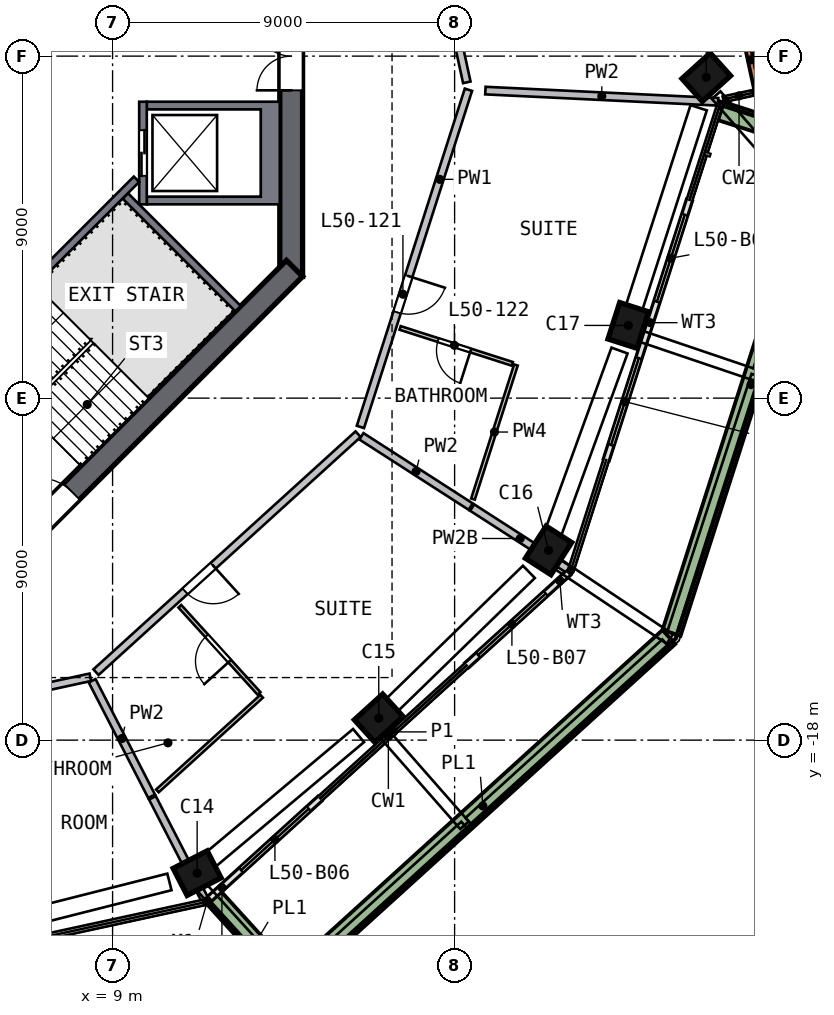
"""IFC4 building model, lengths in metres.
Left out: names, types, materials, properties, quantities, classifications, styles, units other than length and angle.
Written with IfcOpenShell. Run it as: python <this file> out.ifc"""

import sys

from ifc_helpers import new_model, si_unit, direction, frame, frame_2d, origin, origin_2d, place, context, subcontext, project, spatial, polyline, rectangle, outline, extrude, element, fill, save


model = new_model("IFC4")
c1 = context("Model", 3, precision=1e-05, world=origin(), true_north=direction((0.0, 1.0)))
c2 = subcontext(c1, "Body", "Model", "MODEL_VIEW")
j1 = project(units=[si_unit("LENGTHUNIT", "METRE"), si_unit("PLANEANGLEUNIT", "RADIAN")], contexts=[c1])
p1 = place(None, origin())
s1 = spatial("IfcSite", under=j1, at=p1, CompositionType="ELEMENT")
p2 = place(p1, origin())
s2 = spatial("IfcBuilding", under=s1, at=p2, CompositionType="ELEMENT")
p3 = place(p2, frame((0.0, 0.0, 205.5)))
s3 = spatial("IfcBuildingStorey", under=s2, at=p3, CompositionType="ELEMENT", Elevation=205.5)
p4 = place(p3, frame((11.102, -21.565, 0.0), z_axis=(0.102099777, 0.053672705, 0.993325161), x_axis=(-0.883131513, -0.4547247, 0.115343736)))
e1 = element("IfcColumn", 1, at=p4, inside=s3, PredefinedType="COLUMN", context=c2, shape_type="SweptSolid", body=[
    extrude(rectangle(XDim=1.0, YDim=0.8, at=origin_2d()), origin(), (0.0, 0.0, 1.0), 3.211),
])
p5 = place(p3, frame((15.904, -17.515, 0.0), z_axis=(0.082664599, 0.076352583, 0.993648251), x_axis=(0.735625089, 0.667977152, -0.112526675)))
e2 = element("IfcColumn", 2, at=p5, inside=s3, PredefinedType="COLUMN", context=c2, shape_type="SweptSolid", body=[
    extrude(rectangle(XDim=1.0, YDim=0.8, at=origin_2d()), origin(), (0.0, 0.0, 1.0), 3.21),
])
p6 = place(p3, frame((20.397, -13.125, 0.0), z_axis=(0.061579147, 0.097538328, 0.993324863), x_axis=(-0.537392943, -0.83540652, 0.115346307)))
e3 = element("IfcColumn", 3, at=p6, inside=s3, PredefinedType="COLUMN", context=c2, shape_type="SweptSolid", body=[
    extrude(rectangle(XDim=1.0, YDim=0.8, at=origin_2d()), origin(), (0.0, 0.0, 1.0), 3.211),
])
p7 = place(p3, frame((22.531, -7.217, 0.0), z_axis=(0.033461235, 0.107456192, 0.993646573), x_axis=(0.303463828, 0.946173408, -0.11254149)))
e4 = element("IfcColumn", 4, at=p7, inside=s3, PredefinedType="COLUMN", context=c2, shape_type="SweptSolid", body=[
    extrude(rectangle(XDim=1.0, YDim=0.8, at=origin_2d()), origin(), (0.0, 0.0, 1.0), 3.21),
])
p8 = place(p3, frame((24.619, -0.696, 0.0), z_axis=(0.002356254, 0.117052602, 0.993122921), x_axis=(-0.742703167, -0.664810489, 0.080118778)))
e5 = element("IfcColumn", 5, at=p8, inside=s3, PredefinedType="COLUMN", context=c2, shape_type="SweptSolid", body=[
    extrude(rectangle(XDim=1.0, YDim=0.8, at=origin_2d()), origin(), (0.0, 0.0, 1.0), 3.212),
])
p9 = place(p3, frame((13.7, -5.799, 0.0), z_axis=(0.0, 0.0, 1.0), x_axis=(0.0, 1.0, 0.0)))
e6 = element("IfcWall", 6, at=p9, inside=s3, PredefinedType="SHEAR", context=c2, shape_type="SweptSolid", body=[
    extrude(rectangle(XDim=11.598, YDim=0.6, at=frame_2d((5.799, 0.0))), origin(), (0.0, 0.0, 1.0), 3.5),
])
p10 = place(p9, frame((4.899, 0.0, 0.0)))
e7 = element("IfcOpeningElement", 7, at=p10, cuts=e6, PredefinedType="OPENING", context=c2, shape_type="SweptSolid", body=[
    extrude(rectangle(XDim=1.8, YDim=2.1, at=frame_2d((0.9, 1.05))), frame((0.0, 0.31, 0.0), z_axis=(0.0, -1.0, 0.0), x_axis=(1.0, 0.0, 0.0)), (0.0, 0.0, 1.0), 0.62),
])
p11 = place(p3, frame((5.587, -13.788, 0.0), z_axis=(0.0, 0.0, 1.0), x_axis=(0.707106781, 0.707106781, 0.0)))
e8 = element("IfcWall", 8, at=p11, inside=s3, PredefinedType="SHEAR", context=c2, shape_type="SweptSolid", body=[
    extrude(rectangle(XDim=11.598, YDim=0.6, at=frame_2d((5.799, 0.0))), origin(), (0.0, 0.0, 1.0), 3.5),
])
p12 = place(p11, frame((2.099, 0.0, 0.0)))
e9 = element("IfcOpeningElement", 9, at=p12, cuts=e8, PredefinedType="OPENING", context=c2, shape_type="SweptSolid", body=[
    extrude(rectangle(XDim=1.2, YDim=2.1, at=frame_2d((0.6, 1.05))), frame((0.0, 0.31, 0.0), z_axis=(0.0, -1.0, 0.0), x_axis=(1.0, 0.0, 0.0)), (0.0, 0.0, 1.0), 0.62),
])
p13 = place(p3, frame((25.989, -1.013, 0.0), z_axis=(0.0, 0.0, 1.0), x_axis=(-0.212116089, 0.977244475, 0.0)))
e10 = element("IfcWall", 10, at=p13, inside=s3, PredefinedType="SOLIDWALL", context=c2, shape_type="SweptSolid", body=[
    extrude(rectangle(XDim=1.875, YDim=0.15, at=frame_2d((0.938, 0.0))), origin(), (0.0, 0.0, 1.0), 3.19),
])
p14 = place(p3, frame((11.519, -22.206, 0.0), z_axis=(0.0, 0.0, 1.0), x_axis=(0.74031866, 0.672256113, 0.0)))
e11 = element("IfcWall", 11, at=p14, inside=s3, PredefinedType="SOLIDWALL", context=c2, shape_type="SweptSolid", body=[
    extrude(rectangle(XDim=3.967, YDim=0.15, at=frame_2d((1.984, 0.0))), origin(), (0.0, 0.0, 1.0), 2.475),
])
p15 = place(p14, frame((1.167, 0.0, 0.0)))
e12 = element("IfcOpeningElement", 12, at=p15, cuts=e11, PredefinedType="OPENING", context=c2, shape_type="SweptSolid", body=[
    extrude(rectangle(XDim=2.4, YDim=2.4, at=frame_2d((1.2, 1.2))), frame((0.0, 0.085, 0.0), z_axis=(0.0, -1.0, 0.0), x_axis=(1.0, 0.0, 0.0)), (0.0, 0.0, 1.0), 0.17),
])
p16 = place(p3, frame((18.323, -16.028, 0.0), z_axis=(0.0, 0.0, 1.0), x_axis=(0.740316483, 0.672258511, 0.0)))
e13 = element("IfcWall", 13, at=p16, inside=s3, PredefinedType="SOLIDWALL", context=c2, shape_type="SweptSolid", body=[
    extrude(rectangle(XDim=3.609, YDim=0.15, at=frame_2d((1.804, 0.0))), origin(), (0.0, 0.0, 1.0), 2.475),
])
p17 = place(p16, frame((0.4, 0.0, 0.0)))
e14 = element("IfcOpeningElement", 14, at=p17, cuts=e13, PredefinedType="OPENING", context=c2, shape_type="SweptSolid", body=[
    extrude(rectangle(XDim=2.4, YDim=2.4, at=frame_2d((1.2, 1.2))), frame((0.0, 0.085, 0.0), z_axis=(0.0, -1.0, 0.0), x_axis=(1.0, 0.0, 0.0)), (0.0, 0.0, 1.0), 0.17),
])
p18 = place(p3, frame((21.994, -10.615, 0.0), z_axis=(0.0, 0.0, 1.0), x_axis=(0.305046694, 0.952337395, 0.0)))
e15 = element("IfcWall", 15, at=p18, inside=s3, PredefinedType="SOLIDWALL", context=c2, shape_type="SweptSolid", body=[
    extrude(rectangle(XDim=3.4, YDim=0.15, at=frame_2d((1.7, 0.0))), origin(), (0.0, 0.0, 1.0), 2.475),
])
p19 = place(p18, frame((0.4, 0.0, 0.0)))
e16 = element("IfcOpeningElement", 16, at=p19, cuts=e15, PredefinedType="OPENING", context=c2, shape_type="SweptSolid", body=[
    extrude(rectangle(XDim=2.4, YDim=2.4, at=frame_2d((1.2, 1.2))), frame((0.0, 0.085, 0.0), z_axis=(0.0, -1.0, 0.0), x_axis=(1.0, 0.0, 0.0)), (0.0, 0.0, 1.0), 0.17),
])
p20 = place(p3, frame((23.031, -7.377, 0.0), z_axis=(0.0, 0.0, 1.0), x_axis=(0.305067752, 0.95233065, 0.0)))
e17 = element("IfcWall", 17, at=p20, inside=s3, PredefinedType="SOLIDWALL", context=c2, shape_type="SweptSolid", body=[
    extrude(rectangle(XDim=3.761, YDim=0.15, at=frame_2d((1.881, 0.0))), origin(), (0.0, 0.0, 1.0), 2.475),
])
p21 = place(p20, frame((0.961, 0.0, 0.0)))
e18 = element("IfcOpeningElement", 18, at=p21, cuts=e17, PredefinedType="OPENING", context=c2, shape_type="SweptSolid", body=[
    extrude(rectangle(XDim=2.4, YDim=2.4, at=frame_2d((1.2, 1.2))), frame((0.0, 0.085, 0.0), z_axis=(0.0, -1.0, 0.0), x_axis=(1.0, 0.0, 0.0)), (0.0, 0.0, 1.0), 0.17),
])
p22 = place(p3, frame((11.681, -22.162, 0.0), z_axis=(0.0, 0.0, 1.0), x_axis=(0.672289039, -0.74028876, 0.0)))
e19 = element("IfcWall", 19, at=p22, inside=s3, PredefinedType="SOLIDWALL", context=c2, shape_type="SweptSolid", body=[
    extrude(rectangle(XDim=3.199, YDim=0.5, at=frame_2d((1.6, 0.0))), origin(), (0.0, 0.0, 1.0), 0.7),
])
p23 = place(p3, frame((13.848, -24.177, 0.0), z_axis=(0.0, 0.0, 1.0), x_axis=(0.740331756, 0.672241691, 0.0)))
e20 = element("IfcWall", 20, at=p23, inside=s3, PredefinedType="SOLIDWALL", context=c2, shape_type="SweptSolid", body=[
    extrude(rectangle(XDim=13.224, YDim=0.5, at=frame_2d((6.612, 0.0))), origin(), (0.0, 0.0, 1.0), 0.7),
])
p24 = place(p3, frame((23.708, -15.178, 0.0), z_axis=(0.0, 0.0, 1.0), x_axis=(0.305030046, 0.952342728, 0.0)))
e21 = element("IfcWall", 21, at=p24, inside=s3, PredefinedType="SOLIDWALL", context=c2, shape_type="SweptSolid", body=[
    extrude(rectangle(XDim=13.723, YDim=0.5, at=frame_2d((6.862, 0.0))), origin(), (0.0, 0.0, 1.0), 0.7),
])
p25 = place(p3, frame((27.58, -2.271, 0.0), z_axis=(0.0, 0.0, 1.0), x_axis=(-0.952352706, 0.304998891, 0.0)))
e22 = element("IfcWall", 22, at=p25, inside=s3, PredefinedType="SOLIDWALL", context=c2, shape_type="SweptSolid", body=[
    extrude(rectangle(XDim=2.699, YDim=0.5, at=frame_2d((1.35, 0.0))), origin(), (0.0, 0.0, 1.0), 0.7),
])
p26 = place(p3, origin())
e23 = element("IfcWall", 23, at=p26, inside=s3, PredefinedType="SOLIDWALL", context=c2, shape_type="SweptSolid", body=[
    extrude(outline(polyline([(13.4, -3.9), (9.9, -3.9), (9.9, -3.7), (12.9, -3.7), (12.9, -1.4), (9.9, -1.4), (9.9, -1.2), (13.4, -1.2), (13.4, -3.9)])), origin(), (0.0, 0.0, 1.0), 3.19),
])
p27 = place(p3, frame((9.8, -1.2, 0.0), z_axis=(0.0, 0.0, 1.0), x_axis=(0.0, -1.0, 0.0)))
e24 = element("IfcWall", 24, at=p27, inside=s3, PredefinedType="SOLIDWALL", context=c2, shape_type="SweptSolid", body=[
    extrude(rectangle(XDim=2.7, YDim=0.2, at=frame_2d((1.35, 0.0))), origin(), (0.0, 0.0, 1.0), 3.19),
])
p28 = place(p27, frame((0.75, 0.0, 0.0)))
e25 = element("IfcOpeningElement", 25, at=p28, cuts=e24, PredefinedType="OPENING", context=c2, shape_type="SweptSolid", body=[
    extrude(rectangle(XDim=1.2, YDim=2.1, at=frame_2d((0.6, 1.05))), frame((0.0, 0.11, 0.0), z_axis=(0.0, -1.0, 0.0), x_axis=(1.0, 0.0, 0.0)), (0.0, 0.0, 1.0), 0.22),
])
p29 = place(p3, frame((9.629, -3.24, 0.0), z_axis=(0.0, 0.0, 1.0), x_axis=(-0.707120946, -0.707092617, 0.0)))
e26 = element("IfcWall", 26, at=p29, inside=s3, PredefinedType="SOLIDWALL", context=c2, shape_type="SweptSolid", body=[
    extrude(rectangle(XDim=8.618, YDim=0.2, at=frame_2d((4.309, 0.0))), origin(), (0.0, 0.0, 1.0), 3.19),
])
p30 = place(p29, frame((7.018, 0.0, 0.0)))
e27 = element("IfcOpeningElement", 27, at=p30, cuts=e26, PredefinedType="OPENING", context=c2, shape_type="SweptSolid", body=[
    extrude(rectangle(XDim=1.2, YDim=2.1, at=frame_2d((0.6, 1.05))), frame((0.0, 0.11, 0.0), z_axis=(0.0, -1.0, 0.0), x_axis=(1.0, 0.0, 0.0)), (0.0, 0.0, 1.0), 0.22),
])
p31 = place(p3, frame((9.334, -3.677, 0.0), z_axis=(0.0, 0.0, 1.0), x_axis=(0.707135845, -0.707077716, 0.0)))
e28 = element("IfcWall", 28, at=p31, inside=s3, PredefinedType="SOLIDWALL", context=c2, shape_type="SweptSolid", body=[
    extrude(rectangle(XDim=4.2, YDim=0.2, at=frame_2d((2.1, 0.0))), origin(), (0.0, 0.0, 1.0), 3.19),
])
p32 = place(p3, frame((8.415, -16.346, 0.0), z_axis=(0.0, 0.0, 1.0), x_axis=(-0.97726969, -0.211999887, 0.0)))
e29 = element("IfcWall", 29, at=p32, inside=s3, PredefinedType="SOLIDWALL", context=c2, shape_type="SweptSolid", body=[
    extrude(rectangle(XDim=9.316, YDim=0.2, at=frame_2d((4.658, 0.0))), origin(), (0.0, 0.0, 1.0), 3.19),
])
p33 = place(p32, frame((1.9, 0.0, 0.0)))
e30 = element("IfcOpeningElement", 30, at=p33, cuts=e29, PredefinedType="OPENING", context=c2, shape_type="SweptSolid", body=[
    extrude(rectangle(XDim=1.0, YDim=2.1, at=frame_2d((0.5, 1.05))), frame((0.0, 0.11, 0.0), z_axis=(0.0, -1.0, 0.0), x_axis=(1.0, 0.0, 0.0)), (0.0, 0.0, 1.0), 0.22),
])
p34 = place(p3, frame((15.46, -9.948, 0.0), z_axis=(0.0, 0.0, 1.0), x_axis=(-0.740327695, -0.672246163, 0.0)))
e31 = element("IfcWall", 31, at=p34, inside=s3, PredefinedType="SOLIDWALL", context=c2, shape_type="SweptSolid", body=[
    extrude(rectangle(XDim=9.316, YDim=0.2, at=frame_2d((4.658, 0.0))), origin(), (0.0, 0.0, 1.0), 3.19),
])
p35 = place(p34, frame((5.15, 0.0, 0.0)))
e32 = element("IfcOpeningElement", 32, at=p35, cuts=e31, PredefinedType="OPENING", context=c2, shape_type="SweptSolid", body=[
    extrude(rectangle(XDim=1.0, YDim=2.1, at=frame_2d((0.5, 1.05))), frame((0.0, 0.11, 0.0), z_axis=(0.0, -1.0, 0.0), x_axis=(1.0, 0.0, 0.0)), (0.0, 0.0, 1.0), 0.22),
])
p36 = place(p3, frame((18.363, -0.885, 0.0), z_axis=(0.0, 0.0, 1.0), x_axis=(-0.305026737, -0.952343787, 0.0)))
e33 = element("IfcWall", 33, at=p36, inside=s3, PredefinedType="SOLIDWALL", context=c2, shape_type="SweptSolid", body=[
    extrude(rectangle(XDim=9.317, YDim=0.2, at=frame_2d((4.658, 0.0))), origin(), (0.0, 0.0, 1.0), 3.19),
])
p37 = place(p36, frame((5.15, 0.0, 0.0)))
e34 = element("IfcOpeningElement", 34, at=p37, cuts=e33, PredefinedType="OPENING", context=c2, shape_type="SweptSolid", body=[
    extrude(rectangle(XDim=1.0, YDim=2.1, at=frame_2d((0.5, 1.05))), frame((0.0, 0.11, 0.0), z_axis=(0.0, -1.0, 0.0), x_axis=(1.0, 0.0, 0.0)), (0.0, 0.0, 1.0), 0.22),
])
p38 = place(p3, frame((16.346, 8.415, 0.0), z_axis=(0.0, 0.0, 1.0), x_axis=(0.211999887, -0.97726969, 0.0)))
e35 = element("IfcWall", 35, at=p38, inside=s3, PredefinedType="SOLIDWALL", context=c2, shape_type="SweptSolid", body=[
    extrude(rectangle(XDim=9.316, YDim=0.2, at=frame_2d((4.658, 0.0))), origin(), (0.0, 0.0, 1.0), 3.19),
])
p39 = place(p38, frame((3.869, 0.0, 0.0)))
e36 = element("IfcOpeningElement", 36, at=p39, cuts=e35, PredefinedType="OPENING", context=c2, shape_type="SweptSolid", body=[
    extrude(rectangle(XDim=1.8, YDim=2.1, at=frame_2d((0.9, 1.05))), frame((0.0, 0.11, 0.0), z_axis=(0.0, -1.0, 0.0), x_axis=(1.0, 0.0, 0.0)), (0.0, 0.0, 1.0), 0.22),
])
p40 = place(p3, frame((8.462, -16.438, 0.0), z_axis=(0.0, 0.0, 1.0), x_axis=(0.45772397, -0.889094352, 0.0)))
e37 = element("IfcWall", 37, at=p40, inside=s3, PredefinedType="SOLIDWALL", context=c2, shape_type="SweptSolid", body=[
    extrude(rectangle(XDim=3.418, YDim=0.2, at=frame_2d((1.709, 0.0))), origin(), (0.0, 0.0, 1.0), 3.19),
])
p41 = place(p3, frame((10.048, -19.518, 0.0), z_axis=(0.0, 0.0, 1.0), x_axis=(0.457721659, -0.889095542, 0.0)))
e38 = element("IfcWall", 38, at=p41, inside=s3, PredefinedType="SOLIDWALL", context=c2, shape_type="SweptSolid", body=[
    extrude(rectangle(XDim=3.011, YDim=0.2, at=frame_2d((1.506, 0.0))), origin(), (0.0, 0.0, 1.0), 3.19),
])
p42 = place(p3, frame((15.548, -10.004, 0.0), z_axis=(0.0, 0.0, 1.0), x_axis=(0.84093939, -0.541129321, 0.0)))
e39 = element("IfcWall", 39, at=p42, inside=s3, PredefinedType="SOLIDWALL", context=c2, shape_type="SweptSolid", body=[
    extrude(rectangle(XDim=3.418, YDim=0.2, at=frame_2d((1.709, 0.0))), origin(), (0.0, 0.0, 1.0), 3.19),
])
p43 = place(p3, frame((18.461, -11.879, 0.0), z_axis=(0.0, 0.0, 1.0), x_axis=(0.840933425, -0.541138592, 0.0)))
e40 = element("IfcWall", 40, at=p43, inside=s3, PredefinedType="SOLIDWALL", context=c2, shape_type="SweptSolid", body=[
    extrude(rectangle(XDim=3.011, YDim=0.2, at=frame_2d((1.506, 0.0))), origin(), (0.0, 0.0, 1.0), 2.69),
])
p44 = place(p3, frame((24.935, -1.202, 0.0), z_axis=(0.0, 0.0, 1.0), x_axis=(-0.998838948, 0.048174232, 0.0)))
e41 = element("IfcWall", 41, at=p44, inside=s3, PredefinedType="SOLIDWALL", context=c2, shape_type="SweptSolid", body=[
    extrude(rectangle(XDim=6.132, YDim=0.2, at=frame_2d((3.066, 0.0))), origin(), (0.0, 0.0, 1.0), 3.19),
])
p45 = place(p3, frame((12.922, -16.846, 0.0), z_axis=(0.0, 0.0, 1.0), x_axis=(-0.740330652, -0.672242906, 0.0)))
e42 = element("IfcWall", 42, at=p45, inside=s3, PredefinedType="PARTITIONING", context=c2, shape_type="SweptSolid", body=[
    extrude(rectangle(XDim=3.704, YDim=0.1, at=frame_2d((1.852, 0.0))), origin(), (0.0, 0.0, 1.0), 3.19),
])
p46 = place(p3, frame((12.854, -16.772, 0.0), z_axis=(0.0, 0.0, 1.0), x_axis=(-0.672265011, 0.74031058, 0.0)))
e43 = element("IfcWall", 43, at=p46, inside=s3, PredefinedType="PARTITIONING", context=c2, shape_type="SweptSolid", body=[
    extrude(rectangle(XDim=3.1, YDim=0.1, at=frame_2d((1.55, 0.0))), origin(), (0.0, 0.0, 1.0), 3.19),
])
p47 = place(p46, frame((1.15, 0.0, 0.0)))
e44 = element("IfcOpeningElement", 44, at=p47, cuts=e43, PredefinedType="OPENING", context=c2, shape_type="SweptSolid", body=[
    extrude(rectangle(XDim=0.9, YDim=2.1, at=frame_2d((0.45, 1.05))), frame((0.0, 0.06, 0.0), z_axis=(0.0, -1.0, 0.0), x_axis=(1.0, 0.0, 0.0)), (0.0, 0.0, 1.0), 0.12),
])
p48 = place(p3, frame((19.518, -8.098, 0.0), z_axis=(0.0, 0.0, 1.0), x_axis=(-0.952342726, 0.305030051, 0.0)))
e45 = element("IfcWall", 45, at=p48, inside=s3, PredefinedType="PARTITIONING", context=c2, shape_type="SweptSolid", body=[
    extrude(rectangle(XDim=3.1, YDim=0.1, at=frame_2d((1.55, 0.0))), origin(), (0.0, 0.0, 1.0), 3.19),
])
p49 = place(p48, frame((1.15, 0.0, 0.0)))
e46 = element("IfcOpeningElement", 46, at=p49, cuts=e45, PredefinedType="OPENING", context=c2, shape_type="SweptSolid", body=[
    extrude(rectangle(XDim=0.9, YDim=2.1, at=frame_2d((0.45, 1.05))), frame((0.0, 0.06, 0.0), z_axis=(0.0, -1.0, 0.0), x_axis=(1.0, 0.0, 0.0)), (0.0, 0.0, 1.0), 0.12),
])
p50 = place(p3, frame((19.614, -8.128, 0.0), z_axis=(0.0, 0.0, 1.0), x_axis=(-0.304974221, -0.952360606, 0.0)))
e47 = element("IfcWall", 47, at=p50, inside=s3, PredefinedType="PARTITIONING", context=c2, shape_type="SweptSolid", body=[
    extrude(rectangle(XDim=3.704, YDim=0.1, at=frame_2d((1.852, 0.0))), origin(), (0.0, 0.0, 1.0), 3.19),
])
p51 = place(p15, origin())
e48 = element("IfcDoor", 48, at=p51, inside=s3, OperationType="SLIDING_TO_LEFT", PredefinedType="DOOR", context=c2, shape_type="SweptSolid", body=[
    extrude(rectangle(XDim=2.4, YDim=2.4, at=frame_2d((1.2, 1.2))), frame((0.0, 0.025, 0.0), z_axis=(0.0, -1.0, 0.0), x_axis=(1.0, 0.0, 0.0)), (0.0, 0.0, 1.0), 0.05),
])
fill(e12, e48)
p52 = place(p17, origin())
e49 = element("IfcDoor", 49, at=p52, inside=s3, OperationType="SLIDING_TO_RIGHT", PredefinedType="DOOR", context=c2, shape_type="SweptSolid", body=[
    extrude(rectangle(XDim=2.4, YDim=2.4, at=frame_2d((1.2, 1.2))), frame((0.0, 0.025, 0.0), z_axis=(0.0, -1.0, 0.0), x_axis=(1.0, 0.0, 0.0)), (0.0, 0.0, 1.0), 0.05),
])
fill(e14, e49)
p53 = place(p19, origin())
e50 = element("IfcDoor", 50, at=p53, inside=s3, OperationType="SLIDING_TO_RIGHT", PredefinedType="DOOR", context=c2, shape_type="SweptSolid", body=[
    extrude(rectangle(XDim=2.4, YDim=2.4, at=frame_2d((1.2, 1.2))), frame((0.0, 0.025, 0.0), z_axis=(0.0, -1.0, 0.0), x_axis=(1.0, 0.0, 0.0)), (0.0, 0.0, 1.0), 0.05),
])
fill(e16, e50)
p54 = place(p21, origin())
e51 = element("IfcDoor", 51, at=p54, inside=s3, OperationType="SLIDING_TO_LEFT", PredefinedType="DOOR", context=c2, shape_type="SweptSolid", body=[
    extrude(rectangle(XDim=2.4, YDim=2.4, at=frame_2d((1.2, 1.2))), frame((0.0, 0.025, 0.0), z_axis=(0.0, -1.0, 0.0), x_axis=(1.0, 0.0, 0.0)), (0.0, 0.0, 1.0), 0.05),
])
fill(e18, e51)
p55 = place(p28, origin())
e52 = element("IfcDoor", 52, at=p55, inside=s3, OperationType="DOUBLE_DOOR_SLIDING", PredefinedType="DOOR", context=c2, shape_type="SweptSolid", body=[
    extrude(rectangle(XDim=1.2, YDim=2.1, at=frame_2d((0.6, 1.05))), frame((0.0, 0.025, 0.0), z_axis=(0.0, -1.0, 0.0), x_axis=(1.0, 0.0, 0.0)), (0.0, 0.0, 1.0), 0.05),
])
fill(e25, e52)
p56 = place(p10, origin())
e53 = element("IfcDoor", 53, at=p56, inside=s3, OperationType="DOUBLE_DOOR_SINGLE_SWING", PredefinedType="DOOR", context=c2, shape_type="SweptSolid", body=[
    extrude(rectangle(XDim=1.8, YDim=2.1, at=frame_2d((0.9, 1.05))), frame((0.0, 0.025, 0.0), z_axis=(0.0, -1.0, 0.0), x_axis=(1.0, 0.0, 0.0)), (0.0, 0.0, 1.0), 0.05),
])
fill(e7, e53)
p57 = place(p12, origin())
e54 = element("IfcDoor", 54, at=p57, inside=s3, OperationType="SINGLE_SWING_LEFT", PredefinedType="DOOR", context=c2, shape_type="SweptSolid", body=[
    extrude(rectangle(XDim=1.2, YDim=2.1, at=frame_2d((0.6, 1.05))), frame((0.0, 0.025, 0.0), z_axis=(0.0, -1.0, 0.0), x_axis=(1.0, 0.0, 0.0)), (0.0, 0.0, 1.0), 0.05),
])
fill(e9, e54)
p58 = place(p35, origin())
e55 = element("IfcDoor", 55, at=p58, inside=s3, OperationType="SINGLE_SWING_LEFT", PredefinedType="DOOR", context=c2, shape_type="SweptSolid", body=[
    extrude(rectangle(XDim=1.0, YDim=2.1, at=frame_2d((0.5, 1.05))), frame((0.0, 0.025, 0.0), z_axis=(0.0, -1.0, 0.0), x_axis=(1.0, 0.0, 0.0)), (0.0, 0.0, 1.0), 0.05),
])
fill(e32, e55)
p59 = place(p47, origin())
e56 = element("IfcDoor", 56, at=p59, inside=s3, OperationType="SINGLE_SWING_LEFT", PredefinedType="DOOR", context=c2, shape_type="SweptSolid", body=[
    extrude(rectangle(XDim=0.9, YDim=2.1, at=frame_2d((0.45, 1.05))), frame((0.0, 0.025, 0.0), z_axis=(0.0, -1.0, 0.0), x_axis=(1.0, 0.0, 0.0)), (0.0, 0.0, 1.0), 0.05),
])
fill(e44, e56)
p60 = place(p37, origin())
e57 = element("IfcDoor", 57, at=p60, inside=s3, OperationType="SINGLE_SWING_LEFT", PredefinedType="DOOR", context=c2, shape_type="SweptSolid", body=[
    extrude(rectangle(XDim=1.0, YDim=2.1, at=frame_2d((0.5, 1.05))), frame((0.0, 0.025, 0.0), z_axis=(0.0, -1.0, 0.0), x_axis=(1.0, 0.0, 0.0)), (0.0, 0.0, 1.0), 0.05),
])
fill(e34, e57)
p61 = place(p49, origin())
e58 = element("IfcDoor", 58, at=p61, inside=s3, OperationType="SINGLE_SWING_LEFT", PredefinedType="DOOR", context=c2, shape_type="SweptSolid", body=[
    extrude(rectangle(XDim=0.9, YDim=2.1, at=frame_2d((0.45, 1.05))), frame((0.0, 0.025, 0.0), z_axis=(0.0, -1.0, 0.0), x_axis=(1.0, 0.0, 0.0)), (0.0, 0.0, 1.0), 0.05),
])
fill(e46, e58)
save(model, sys.argv[1])
